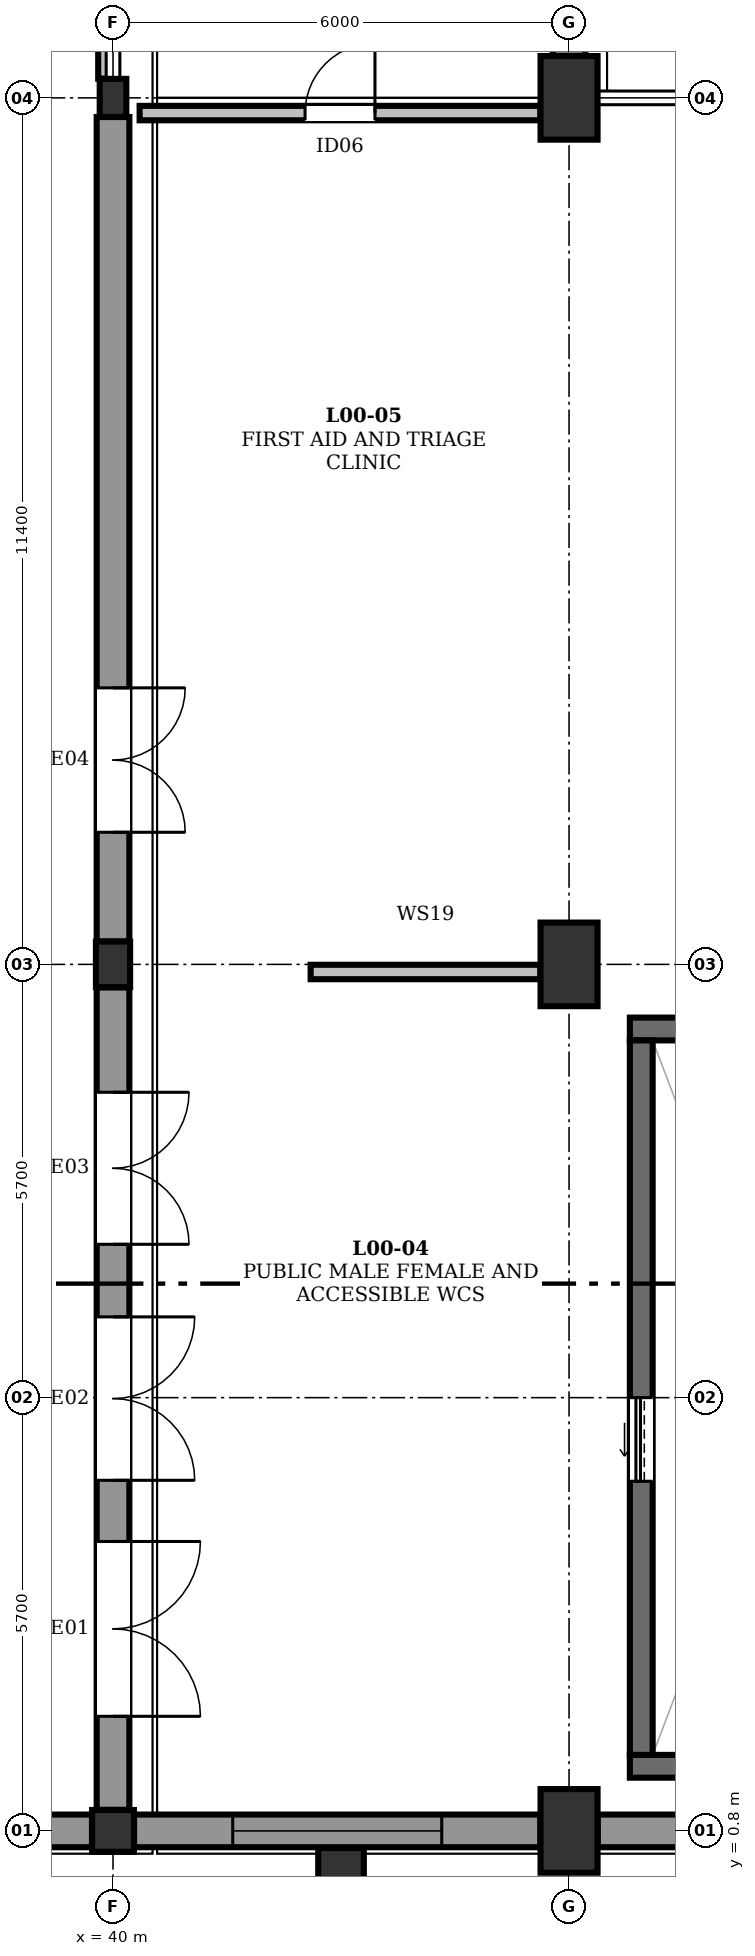
"""IFC4 building model, lengths in metres.
Left out: names, types, materials, properties, quantities, classifications, styles, units other than length and angle.
Written with IfcOpenShell. Run it as: python <this file> out.ifc"""

import sys

from ifc_helpers import new_model, si_unit, direction, frame, frame_2d, origin, origin_2d, place, context, subcontext, project, spatial, rectangle, extrude, element, fill, save


model = new_model("IFC4")
c1 = context("Model", 3, precision=1e-05, world=origin(), true_north=direction((0.0, 1.0)))
c2 = subcontext(c1, "Body", "Model", "MODEL_VIEW")
j1 = project(units=[si_unit("LENGTHUNIT", "METRE"), si_unit("PLANEANGLEUNIT", "RADIAN")], contexts=[c1])
p1 = place(None, origin())
s1 = spatial("IfcSite", under=j1, at=p1, CompositionType="ELEMENT")
p2 = place(p1, origin())
s2 = spatial("IfcBuilding", under=s1, at=p2, CompositionType="ELEMENT")
p3 = place(p2, origin())
s3 = spatial("IfcBuildingStorey", under=s2, at=p3, CompositionType="ELEMENT", Elevation=0.0)
p4 = place(p3, frame((40.0, 0.8, 0.0), z_axis=(0.0, 0.0, 1.0), x_axis=(1.0, 0.0, 0.0)))
e1 = element("IfcColumn", 1, at=p4, inside=s3, PredefinedType="COLUMN", context=c2, shape_type="SweptSolid", body=[
    extrude(rectangle(XDim=0.55, YDim=0.55, at=origin_2d()), origin(), (0.0, 0.0, 1.0), 5.4),
])
p5 = place(p3, frame((40.0, 12.2, 0.0), z_axis=(0.0, 0.0, 1.0), x_axis=(1.0, 0.0, 0.0)))
e2 = element("IfcColumn", 2, at=p5, inside=s3, PredefinedType="PILASTER", context=c2, shape_type="SweptSolid", body=[
    extrude(rectangle(XDim=0.45, YDim=0.6, at=origin_2d()), origin(), (0.0, 0.0, 1.0), 5.4),
])
p6 = place(p3, frame((40.0, 23.6, 0.0), z_axis=(0.0, 0.0, 1.0), x_axis=(1.0, 0.0, 0.0)))
e3 = element("IfcColumn", 3, at=p6, inside=s3, PredefinedType="PILASTER", context=c2, shape_type="SweptSolid", body=[
    extrude(rectangle(XDim=0.35, YDim=0.5, at=origin_2d()), origin(), (0.0, 0.0, 1.0), 5.4),
])
for number, where, z_axis, x_axis in (
    (4, (46.0, 0.8, 0.0), (0.0, 0.0, 1.0), (1.0, 0.0, 0.0)),
    (5, (46.0, 12.2, 0.0), (0.0, 0.0, 1.0), (1.0, 0.0, 0.0)),
    (6, (46.0, 23.6, 0.0), (0.0, 0.0, 1.0), (1.0, 0.0, 0.0)),
):
    element("IfcColumn", number, at=place(p3, frame(where, z_axis=z_axis, x_axis=x_axis)), inside=s3, PredefinedType="COLUMN", context=c2, shape_type="SweptSolid", body=[
        extrude(rectangle(XDim=0.75, YDim=1.1, at=origin_2d()), origin(), (0.0, 0.0, 1.0), 5.4),
    ])
p7 = place(p3, frame((43.0, 0.35, 0.0), z_axis=(0.0, 0.0, 1.0), x_axis=(0.0, 1.0, 0.0)))
e7 = element("IfcColumn", 7, at=p7, inside=s3, PredefinedType="PILASTER", context=c2, shape_type="SweptSolid", body=[
    extrude(rectangle(XDim=0.45, YDim=0.6, at=origin_2d()), origin(), (0.0, 0.0, 1.0), 5.4),
])
p8 = place(p3, frame((32.377, 0.8, 0.0), z_axis=(0.0, 0.0, 1.0), x_axis=(1.0, 0.0, 0.0)))
e8 = element("IfcWall", 8, at=p8, inside=s3, PredefinedType="STANDARD", context=c2, shape_type="SweptSolid", body=[
    extrude(rectangle(XDim=7.346, YDim=0.43, at=frame_2d((3.673, 0.0))), origin(), (0.0, 0.0, 1.0), 4.612),
])
p9 = place(p8, frame((1.35, 0.0, 0.75)))
e9 = element("IfcOpeningElement", 9, at=p9, cuts=e8, PredefinedType="OPENING", context=c2, shape_type="SweptSolid", body=[
    extrude(rectangle(XDim=1.2, YDim=2.05, at=frame_2d((0.6, 1.025))), frame((0.0, 0.227, 0.0), z_axis=(0.0, -1.0, 0.0), x_axis=(1.0, 0.0, 0.0)), (0.0, 0.0, 1.0), 0.454),
])
p10 = place(p8, frame((3.073, 0.0, 0.75)))
e10 = element("IfcOpeningElement", 10, at=p10, cuts=e8, PredefinedType="OPENING", context=c2, shape_type="SweptSolid", body=[
    extrude(rectangle(XDim=1.2, YDim=2.05, at=frame_2d((0.6, 1.025))), frame((0.0, 0.227, 0.0), z_axis=(0.0, -1.0, 0.0), x_axis=(1.0, 0.0, 0.0)), (0.0, 0.0, 1.0), 0.454),
])
p11 = place(p8, frame((4.796, 0.0, 0.75)))
e11 = element("IfcOpeningElement", 11, at=p11, cuts=e8, PredefinedType="OPENING", context=c2, shape_type="SweptSolid", body=[
    extrude(rectangle(XDim=1.2, YDim=2.05, at=frame_2d((0.6, 1.025))), frame((0.0, 0.227, 0.0), z_axis=(0.0, -1.0, 0.0), x_axis=(1.0, 0.0, 0.0)), (0.0, 0.0, 1.0), 0.454),
])
p12 = place(p3, frame((40.0, 1.077, 0.0), z_axis=(0.0, 0.0, 1.0), x_axis=(0.0, 1.0, 0.0)))
e12 = element("IfcWall", 12, at=p12, inside=s3, PredefinedType="STANDARD", context=c2, shape_type="SweptSolid", body=[
    extrude(rectangle(XDim=10.821, YDim=0.43, at=frame_2d((5.411, 0.0))), origin(), (0.0, 0.0, 1.0), 4.245),
])
p13 = place(p12, frame((1.231, 0.0, 0.0)))
e13 = element("IfcOpeningElement", 13, at=p13, cuts=e12, PredefinedType="OPENING", context=c2, shape_type="SweptSolid", body=[
    extrude(rectangle(XDim=2.3, YDim=2.4, at=frame_2d((1.15, 1.2))), frame((0.0, 0.227, 0.0), z_axis=(0.0, -1.0, 0.0), x_axis=(1.0, 0.0, 0.0)), (0.0, 0.0, 1.0), 0.454),
])
p14 = place(p12, frame((4.335, 0.0, 0.0)))
e14 = element("IfcOpeningElement", 14, at=p14, cuts=e12, PredefinedType="OPENING", context=c2, shape_type="SweptSolid", body=[
    extrude(rectangle(XDim=2.15, YDim=2.4, at=frame_2d((1.075, 1.2))), frame((0.0, 0.227, 0.0), z_axis=(0.0, -1.0, 0.0), x_axis=(1.0, 0.0, 0.0)), (0.0, 0.0, 1.0), 0.454),
])
p15 = place(p12, frame((7.44, 0.0, 0.0)))
e15 = element("IfcOpeningElement", 15, at=p15, cuts=e12, PredefinedType="OPENING", context=c2, shape_type="SweptSolid", body=[
    extrude(rectangle(XDim=2.0, YDim=2.35, at=frame_2d((1.0, 1.175))), frame((0.0, 0.227, 0.0), z_axis=(0.0, -1.0, 0.0), x_axis=(1.0, 0.0, 0.0)), (0.0, 0.0, 1.0), 0.454),
])
p16 = place(p3, frame((40.0, 12.502, 0.0), z_axis=(0.0, 0.0, 1.0), x_axis=(0.0, 1.0, 0.0)))
e16 = element("IfcWall", 16, at=p16, inside=s3, PredefinedType="STANDARD", context=c2, shape_type="SweptSolid", body=[
    extrude(rectangle(XDim=10.846, YDim=0.43, at=frame_2d((5.423, 0.0))), origin(), (0.0, 0.0, 1.0), 4.245),
])
p17 = place(p16, frame((1.436, 0.0, 0.0)))
e17 = element("IfcOpeningElement", 17, at=p17, cuts=e16, PredefinedType="OPENING", context=c2, shape_type="SweptSolid", body=[
    extrude(rectangle(XDim=1.9, YDim=2.3, at=frame_2d((0.95, 1.15))), frame((0.0, 0.227, 0.0), z_axis=(0.0, -1.0, 0.0), x_axis=(1.0, 0.0, 0.0)), (0.0, 0.0, 1.0), 0.454),
])
p18 = place(p3, frame((40.277, 0.8, 0.0), z_axis=(0.0, 0.0, 1.0), x_axis=(1.0, 0.0, 0.0)))
e18 = element("IfcWall", 18, at=p18, inside=s3, PredefinedType="STANDARD", context=c2, shape_type="SweptSolid", body=[
    extrude(rectangle(XDim=5.346, YDim=0.43, at=frame_2d((2.673, 0.0))), origin(), (0.0, 0.0, 1.0), 4.612),
])
p19 = place(p18, frame((1.298, 0.0, 0.75)))
e19 = element("IfcOpeningElement", 19, at=p19, cuts=e18, PredefinedType="OPENING", context=c2, shape_type="SweptSolid", body=[
    extrude(rectangle(XDim=2.75, YDim=2.35, at=frame_2d((1.375, 1.175))), frame((0.0, 0.227, 0.0), z_axis=(0.0, -1.0, 0.0), x_axis=(1.0, 0.0, 0.0)), (0.0, 0.0, 1.0), 0.454),
])
p20 = place(p3, frame((46.377, 0.8, 0.0), z_axis=(0.0, 0.0, 1.0), x_axis=(1.0, 0.0, 0.0)))
e20 = element("IfcWall", 20, at=p20, inside=s3, PredefinedType="STANDARD", context=c2, shape_type="SweptSolid", body=[
    extrude(rectangle(XDim=9.246, YDim=0.43, at=frame_2d((4.623, 0.0))), origin(), (0.0, 0.0, 1.0), 4.612),
])
p21 = place(p20, frame((1.35, 0.0, 0.75)))
e21 = element("IfcOpeningElement", 21, at=p21, cuts=e20, PredefinedType="OPENING", context=c2, shape_type="SweptSolid", body=[
    extrude(rectangle(XDim=1.35, YDim=1.55, at=frame_2d((0.675, 0.775))), frame((0.0, 0.227, 0.0), z_axis=(0.0, -1.0, 0.0), x_axis=(1.0, 0.0, 0.0)), (0.0, 0.0, 1.0), 0.454),
])
p22 = place(p20, frame((3.948, 0.0, 0.75)))
e22 = element("IfcOpeningElement", 22, at=p22, cuts=e20, PredefinedType="OPENING", context=c2, shape_type="SweptSolid", body=[
    extrude(rectangle(XDim=1.35, YDim=1.55, at=frame_2d((0.675, 0.775))), frame((0.0, 0.227, 0.0), z_axis=(0.0, -1.0, 0.0), x_axis=(1.0, 0.0, 0.0)), (0.0, 0.0, 1.0), 0.454),
])
p23 = place(p20, frame((6.546, 0.0, 0.75)))
e23 = element("IfcOpeningElement", 23, at=p23, cuts=e20, PredefinedType="OPENING", context=c2, shape_type="SweptSolid", body=[
    extrude(rectangle(XDim=1.35, YDim=1.55, at=frame_2d((0.675, 0.775))), frame((0.0, 0.227, 0.0), z_axis=(0.0, -1.0, 0.0), x_axis=(1.0, 0.0, 0.0)), (0.0, 0.0, 1.0), 0.454),
])
p24 = place(p3, frame((46.0, 24.152, 0.0), z_axis=(0.0, 0.0, 1.0), x_axis=(0.0, 1.0, 0.0)))
e24 = element("IfcWall", 24, at=p24, inside=s3, PredefinedType="STANDARD", context=c2, shape_type="SweptSolid", body=[
    extrude(rectangle(XDim=10.296, YDim=0.43, at=frame_2d((5.148, 0.0))), origin(), (0.0, 0.0, 1.0), 5.15),
])
p25 = place(p24, frame((1.265, 0.0, 0.0)))
e25 = element("IfcOpeningElement", 25, at=p25, cuts=e24, PredefinedType="OPENING", context=c2, shape_type="SweptSolid", body=[
    extrude(rectangle(XDim=2.0, YDim=2.35, at=frame_2d((1.0, 1.175))), frame((0.0, 0.227, 0.0), z_axis=(0.0, -1.0, 0.0), x_axis=(1.0, 0.0, 0.0)), (0.0, 0.0, 1.0), 0.454),
])
p26 = place(p24, frame((4.198, 0.0, 0.0)))
e26 = element("IfcOpeningElement", 26, at=p26, cuts=e24, PredefinedType="OPENING", context=c2, shape_type="SweptSolid", body=[
    extrude(rectangle(XDim=1.9, YDim=2.3, at=frame_2d((0.95, 1.15))), frame((0.0, 0.227, 0.0), z_axis=(0.0, -1.0, 0.0), x_axis=(1.0, 0.0, 0.0)), (0.0, 0.0, 1.0), 0.454),
])
for number, where, z_axis, x_axis in (
    (27, (46.8, 1.65, 0.0), (0.0, 0.0, 1.0), (1.0, 0.0, 0.0)),
    (28, (46.8, 11.35, 0.0), (0.0, 0.0, 1.0), (1.0, 0.0, 0.0)),
):
    element("IfcWall", number, at=place(p3, frame(where, z_axis=z_axis, x_axis=x_axis)), inside=s3, PredefinedType="SHEAR", context=c2, shape_type="SweptSolid", body=[
        extrude(rectangle(XDim=8.0, YDim=0.3, at=frame_2d((4.0, 0.0))), origin(), (0.0, 0.0, 1.0), 5.16),
    ])
p27 = place(p3, frame((46.95, 1.8, 0.0), z_axis=(0.0, 0.0, 1.0), x_axis=(0.0, 1.0, 0.0)))
e29 = element("IfcWall", 29, at=p27, inside=s3, PredefinedType="SHEAR", context=c2, shape_type="SweptSolid", body=[
    extrude(rectangle(XDim=9.4, YDim=0.3, at=frame_2d((4.7, 0.0))), origin(), (0.0, 0.0, 1.0), 5.16),
])
p28 = place(p27, frame((3.6, 0.0, 0.0)))
e30 = element("IfcOpeningElement", 30, at=p28, cuts=e29, PredefinedType="OPENING", context=c2, shape_type="SweptSolid", body=[
    extrude(rectangle(XDim=1.1, YDim=2.2, at=frame_2d((0.55, 1.1))), frame((0.0, 0.162, 0.0), z_axis=(0.0, -1.0, 0.0), x_axis=(1.0, 0.0, 0.0)), (0.0, 0.0, 1.0), 0.324),
])
p29 = place(p3, frame((42.6, 12.1, 0.0), z_axis=(0.0, 0.0, 1.0), x_axis=(1.0, 0.0, 0.0)))
e31 = element("IfcWall", 31, at=p29, inside=s3, PredefinedType="SOLIDWALL", context=c2, shape_type="SweptSolid", body=[
    extrude(rectangle(XDim=3.023, YDim=0.19, at=frame_2d((1.511, 0.0))), origin(), (0.0, 0.0, 1.0), 4.245),
])
p30 = place(p3, frame((40.35, 23.4, 0.0), z_axis=(0.0, 0.0, 1.0), x_axis=(1.0, 0.0, 0.0)))
e32 = element("IfcWall", 32, at=p30, inside=s3, PredefinedType="SOLIDWALL", context=c2, shape_type="SweptSolid", body=[
    extrude(rectangle(XDim=5.273, YDim=0.19, at=frame_2d((2.636, 0.0))), origin(), (0.0, 0.0, 1.0), 4.245),
])
p31 = place(p30, frame((2.177, 0.0, 0.0)))
e33 = element("IfcOpeningElement", 33, at=p31, cuts=e32, PredefinedType="OPENING", context=c2, shape_type="SweptSolid", body=[
    extrude(rectangle(XDim=0.92, YDim=2.1, at=frame_2d((0.46, 1.05))), frame((0.0, 0.107, 0.0), z_axis=(0.0, -1.0, 0.0), x_axis=(1.0, 0.0, 0.0)), (0.0, 0.0, 1.0), 0.214),
])
p32 = place(p3, frame((39.9, 23.852, 0.0), z_axis=(0.0, 0.0, 1.0), x_axis=(0.0, 1.0, 0.0)))
e34 = element("IfcWall", 34, at=p32, inside=s3, PredefinedType="SOLIDWALL", context=c2, shape_type="SweptSolid", body=[
    extrude(rectangle(XDim=10.846, YDim=0.19, at=frame_2d((5.423, 0.0))), origin(), (0.0, 0.0, 1.0), 4.245),
])
p33 = place(p32, frame((4.823, 0.0, 0.0)))
e35 = element("IfcOpeningElement", 35, at=p33, cuts=e34, PredefinedType="OPENING", context=c2, shape_type="SweptSolid", body=[
    extrude(rectangle(XDim=1.2, YDim=2.2, at=frame_2d((0.6, 1.1))), frame((0.0, 0.107, 0.0), z_axis=(0.0, -1.0, 0.0), x_axis=(1.0, 0.0, 0.0)), (0.0, 0.0, 1.0), 0.214),
])
p34 = place(p13, frame((2.3, 0.0, 0.0), z_axis=(0.0, 0.0, 1.0), x_axis=(-1.0, 0.0, 0.0)))
e36 = element("IfcDoor", 36, at=p34, inside=s3, OperationType="DOUBLE_DOOR_SINGLE_SWING", PredefinedType="DOOR", context=c2, shape_type="SweptSolid", body=[
    extrude(rectangle(XDim=2.3, YDim=2.4, at=frame_2d((1.15, 1.2))), frame((0.0, 0.025, 0.0), z_axis=(0.0, -1.0, 0.0), x_axis=(1.0, 0.0, 0.0)), (0.0, 0.0, 1.0), 0.05),
])
fill(e13, e36)
p35 = place(p14, frame((2.15, 0.0, 0.0), z_axis=(0.0, 0.0, 1.0), x_axis=(-1.0, 0.0, 0.0)))
e37 = element("IfcDoor", 37, at=p35, inside=s3, OperationType="DOUBLE_DOOR_SINGLE_SWING", PredefinedType="DOOR", context=c2, shape_type="SweptSolid", body=[
    extrude(rectangle(XDim=2.15, YDim=2.4, at=frame_2d((1.075, 1.2))), frame((0.0, 0.025, 0.0), z_axis=(0.0, -1.0, 0.0), x_axis=(1.0, 0.0, 0.0)), (0.0, 0.0, 1.0), 0.05),
])
fill(e14, e37)
p36 = place(p15, frame((2.0, 0.0, 0.0), z_axis=(0.0, 0.0, 1.0), x_axis=(-1.0, 0.0, 0.0)))
e38 = element("IfcDoor", 38, at=p36, inside=s3, OperationType="DOUBLE_DOOR_SINGLE_SWING", PredefinedType="DOOR", context=c2, shape_type="SweptSolid", body=[
    extrude(rectangle(XDim=2.0, YDim=2.35, at=frame_2d((1.0, 1.175))), frame((0.0, 0.025, 0.0), z_axis=(0.0, -1.0, 0.0), x_axis=(1.0, 0.0, 0.0)), (0.0, 0.0, 1.0), 0.05),
])
fill(e15, e38)
p37 = place(p17, frame((1.9, 0.0, 0.0), z_axis=(0.0, 0.0, 1.0), x_axis=(-1.0, 0.0, 0.0)))
e39 = element("IfcDoor", 39, at=p37, inside=s3, OperationType="DOUBLE_DOOR_SINGLE_SWING", PredefinedType="DOOR", context=c2, shape_type="SweptSolid", body=[
    extrude(rectangle(XDim=1.9, YDim=2.3, at=frame_2d((0.95, 1.15))), frame((0.0, 0.025, 0.0), z_axis=(0.0, -1.0, 0.0), x_axis=(1.0, 0.0, 0.0)), (0.0, 0.0, 1.0), 0.05),
])
fill(e17, e39)
p38 = place(p19, origin())
e40 = element("IfcWindow", 40, at=p38, inside=s3, PartitioningType="TRIPLE_PANEL_VERTICAL", PredefinedType="WINDOW", context=c2, shape_type="SweptSolid", body=[
    extrude(rectangle(XDim=2.75, YDim=2.35, at=frame_2d((1.375, 1.175))), frame((0.0, 0.08, 0.0), z_axis=(0.0, -1.0, 0.0), x_axis=(1.0, 0.0, 0.0)), (0.0, 0.0, 1.0), 0.06),
])
fill(e19, e40)
p39 = place(p28, origin())
e41 = element("IfcDoor", 41, at=p39, inside=s3, OperationType="SLIDING_TO_LEFT", PredefinedType="DOOR", context=c2, shape_type="SweptSolid", body=[
    extrude(rectangle(XDim=1.1, YDim=2.2, at=frame_2d((0.55, 1.1))), frame((0.0, 0.025, 0.0), z_axis=(0.0, -1.0, 0.0), x_axis=(1.0, 0.0, 0.0)), (0.0, 0.0, 1.0), 0.05),
])
fill(e30, e41)
p40 = place(p31, origin())
e42 = element("IfcDoor", 42, at=p40, inside=s3, OperationType="SINGLE_SWING_RIGHT", PredefinedType="DOOR", context=c2, shape_type="SweptSolid", body=[
    extrude(rectangle(XDim=0.92, YDim=2.1, at=frame_2d((0.46, 1.05))), frame((0.0, 0.025, 0.0), z_axis=(0.0, -1.0, 0.0), x_axis=(1.0, 0.0, 0.0)), (0.0, 0.0, 1.0), 0.05),
])
fill(e33, e42)
save(model, sys.argv[1])
